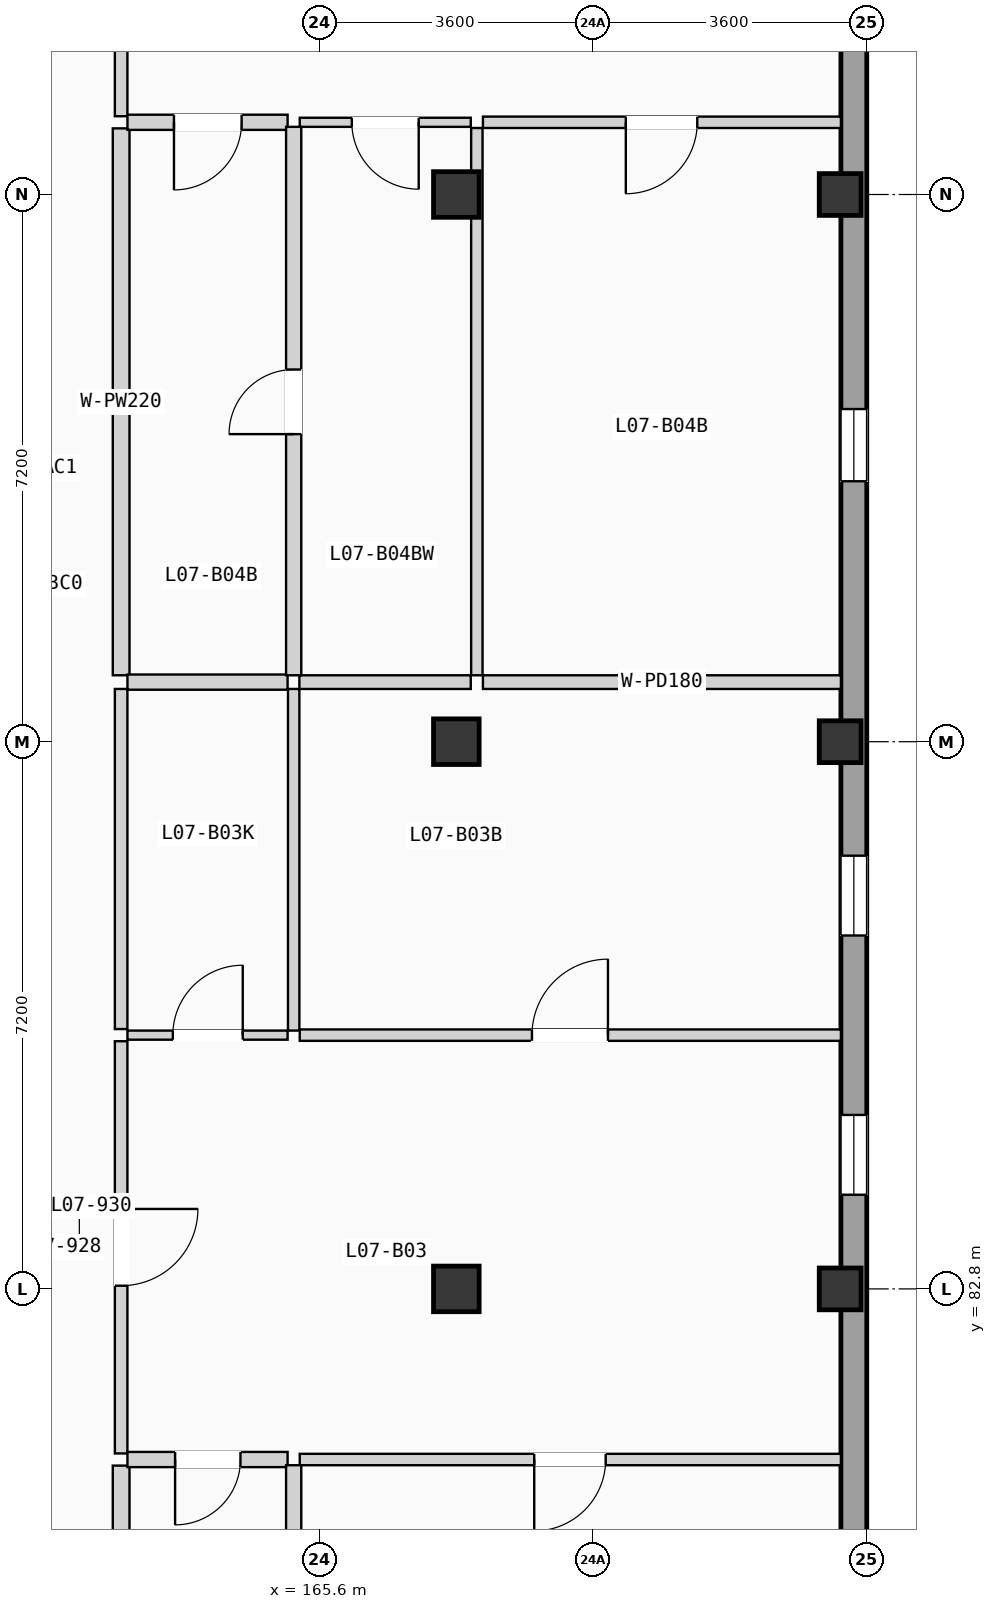
"""IFC4 building model, lengths in metres.
Left out: names, types, materials, properties, quantities, classifications, styles, units other than length and angle.
Written with IfcOpenShell. Run it as: python <this file> out.ifc"""

import sys

from ifc_helpers import new_model, si_unit, direction, frame, frame_2d, origin, origin_2d, place, context, subcontext, project, spatial, rectangle, extrude, element, fill, save


model = new_model("IFC4")
c1 = context("Model", 3, precision=1e-05, world=origin(), true_north=direction((0.0, 1.0)))
c2 = subcontext(c1, "Body", "Model", "MODEL_VIEW")
j1 = project(units=[si_unit("LENGTHUNIT", "METRE"), si_unit("PLANEANGLEUNIT", "RADIAN")], contexts=[c1])
p1 = place(None, origin())
s1 = spatial("IfcSite", under=j1, at=p1, CompositionType="ELEMENT")
p2 = place(p1, origin())
s2 = spatial("IfcBuilding", under=s1, at=p2, CompositionType="ELEMENT")
p3 = place(p2, frame((0.0, 0.0, 24.675)))
s3 = spatial("IfcBuildingStorey", under=s2, at=p3, CompositionType="ELEMENT", Elevation=24.675)
for number, where, z_axis, x_axis in (
    (1, (167.4, 82.8, 0.0), (0.0, 0.0, 1.0), (1.0, 0.0, 0.0)),
    (2, (167.4, 90.0, 0.0), (0.0, 0.0, 1.0), (1.0, 0.0, 0.0)),
    (3, (167.4, 97.2, 0.0), (0.0, 0.0, 1.0), (1.0, 0.0, 0.0)),
):
    element("IfcColumn", number, at=place(p3, frame(where, z_axis=z_axis, x_axis=x_axis)), inside=s3, PredefinedType="COLUMN", context=c2, shape_type="SweptSolid", body=[
        extrude(rectangle(XDim=0.6, YDim=0.6, at=origin_2d()), origin(), (0.0, 0.0, 1.0), 3.15),
    ])
for number, where, z_axis, x_axis in (
    (4, (172.45, 82.8, 0.0), (0.0, 0.0, 1.0), (1.0, 0.0, 0.0)),
    (5, (172.45, 90.0, 0.0), (0.0, 0.0, 1.0), (1.0, 0.0, 0.0)),
    (6, (172.45, 97.2, 0.0), (0.0, 0.0, 1.0), (1.0, 0.0, 0.0)),
):
    element("IfcColumn", number, at=place(p3, frame(where, z_axis=z_axis, x_axis=x_axis)), inside=s3, PredefinedType="COLUMN", context=c2, shape_type="SweptSolid", body=[
        extrude(rectangle(XDim=0.55, YDim=0.55, at=origin_2d()), origin(), (0.0, 0.0, 1.0), 3.15),
    ])
p4 = place(p3, frame((172.63, 68.74, 0.0), z_axis=(0.0, 0.0, 1.0), x_axis=(0.0, 1.0, 0.0)))
e7 = element("IfcWall", 7, at=p4, inside=s3, PredefinedType="SOLIDWALL", context=c2, shape_type="SweptSolid", body=[
    extrude(rectangle(XDim=49.72, YDim=0.34, at=frame_2d((24.86, 0.0))), origin(), (0.0, 0.0, 1.0), 2.9),
])
p5 = place(p4, frame((15.299, 0.0, 0.9)))
e8 = element("IfcOpeningElement", 8, at=p5, cuts=e7, PredefinedType="OPENING", context=c2, shape_type="SweptSolid", body=[
    extrude(rectangle(XDim=1.05, YDim=1.2, at=frame_2d((0.525, 0.6))), frame((0.0, 0.18, 0.0), z_axis=(0.0, -1.0, 0.0), x_axis=(1.0, 0.0, 0.0)), (0.0, 0.0, 1.0), 0.36),
])
p6 = place(p4, frame((8.972, 0.0, 0.865)))
e9 = element("IfcOpeningElement", 9, at=p6, cuts=e7, PredefinedType="OPENING", context=c2, shape_type="SweptSolid", body=[
    extrude(rectangle(XDim=1.05, YDim=1.35, at=frame_2d((0.525, 0.675))), frame((0.0, 0.18, 0.0), z_axis=(0.0, -1.0, 0.0), x_axis=(1.0, 0.0, 0.0)), (0.0, 0.0, 1.0), 0.36),
])
p7 = place(p4, frame((18.71, 0.0, 0.715)))
e10 = element("IfcOpeningElement", 10, at=p7, cuts=e7, PredefinedType="OPENING", context=c2, shape_type="SweptSolid", body=[
    extrude(rectangle(XDim=1.05, YDim=1.5, at=frame_2d((0.525, 0.75))), frame((0.0, 0.18, 0.0), z_axis=(0.0, -1.0, 0.0), x_axis=(1.0, 0.0, 0.0)), (0.0, 0.0, 1.0), 0.36),
])
p8 = place(p4, frame((31.535, 0.0, 0.565)))
e11 = element("IfcOpeningElement", 11, at=p8, cuts=e7, PredefinedType="OPENING", context=c2, shape_type="SweptSolid", body=[
    extrude(rectangle(XDim=1.05, YDim=1.65, at=frame_2d((0.525, 0.825))), frame((0.0, 0.18, 0.0), z_axis=(0.0, -1.0, 0.0), x_axis=(1.0, 0.0, 0.0)), (0.0, 0.0, 1.0), 0.36),
])
p9 = place(p4, frame((24.687, 0.0, 0.85)))
e12 = element("IfcOpeningElement", 12, at=p9, cuts=e7, PredefinedType="OPENING", context=c2, shape_type="SweptSolid", body=[
    extrude(rectangle(XDim=0.95, YDim=1.2, at=frame_2d((0.475, 0.6))), frame((0.0, 0.18, 0.0), z_axis=(0.0, -1.0, 0.0), x_axis=(1.0, 0.0, 0.0)), (0.0, 0.0, 1.0), 0.36),
])
p10 = place(p4, frame((38.62, 0.0, 0.9)))
e13 = element("IfcOpeningElement", 13, at=p10, cuts=e7, PredefinedType="OPENING", context=c2, shape_type="SweptSolid", body=[
    extrude(rectangle(XDim=1.15, YDim=1.2, at=frame_2d((0.575, 0.6))), frame((0.0, 0.18, 0.0), z_axis=(0.0, -1.0, 0.0), x_axis=(1.0, 0.0, 0.0)), (0.0, 0.0, 1.0), 0.36),
])
p11 = place(p3, frame((162.99, 80.635, 0.0), z_axis=(0.0, 0.0, 1.0), x_axis=(0.0, 1.0, 0.0)))
e14 = element("IfcWall", 14, at=p11, inside=s3, PredefinedType="PARTITIONING", context=c2, shape_type="SweptSolid", body=[
    extrude(rectangle(XDim=5.424, YDim=0.165, at=frame_2d((2.712, 0.0))), origin(), (0.0, 0.0, 1.0), 2.87),
])
p12 = place(p11, frame((2.207, 0.0, 0.0)))
e15 = element("IfcOpeningElement", 15, at=p12, cuts=e14, PredefinedType="OPENING", context=c2, shape_type="SweptSolid", body=[
    extrude(rectangle(XDim=1.01, YDim=2.11, at=frame_2d((0.505, 1.055))), frame((0.0, 0.093, 0.0), z_axis=(0.0, -1.0, 0.0), x_axis=(1.0, 0.0, 0.0)), (0.0, 0.0, 1.0), 0.185),
])
p13 = place(p3, frame((162.99, 75.975, 0.0), z_axis=(0.0, 0.0, 1.0), x_axis=(0.0, 1.0, 0.0)))
e16 = element("IfcWall", 16, at=p13, inside=s3, PredefinedType="PLUMBINGWALL", context=c2, shape_type="SweptSolid", body=[
    extrude(rectangle(XDim=4.5, YDim=0.22, at=frame_2d((2.25, 0.0))), origin(), (0.0, 0.0, 1.0), 2.87),
])
p14 = place(p3, frame((162.99, 86.219, 0.0), z_axis=(0.0, 0.0, 1.0), x_axis=(0.0, 1.0, 0.0)))
e17 = element("IfcWall", 17, at=p14, inside=s3, PredefinedType="PARTITIONING", context=c2, shape_type="SweptSolid", body=[
    extrude(rectangle(XDim=4.475, YDim=0.165, at=frame_2d((2.238, 0.0))), origin(), (0.0, 0.0, 1.0), 2.87),
])
p15 = place(p3, frame((162.99, 98.23, 0.0), z_axis=(0.0, 0.0, 1.0), x_axis=(0.0, 1.0, 0.0)))
e18 = element("IfcWall", 18, at=p15, inside=s3, PredefinedType="PARTITIONING", context=c2, shape_type="SweptSolid", body=[
    extrude(rectangle(XDim=5.14, YDim=0.165, at=frame_2d((2.57, 0.0))), origin(), (0.0, 0.0, 1.0), 2.87),
])
p16 = place(p15, frame((2.065, 0.0, 0.0)))
e19 = element("IfcOpeningElement", 19, at=p16, cuts=e18, PredefinedType="OPENING", context=c2, shape_type="SweptSolid", body=[
    extrude(rectangle(XDim=1.01, YDim=2.11, at=frame_2d((0.505, 1.055))), frame((0.0, 0.093, 0.0), z_axis=(0.0, -1.0, 0.0), x_axis=(1.0, 0.0, 0.0)), (0.0, 0.0, 1.0), 0.185),
])
p17 = place(p3, frame((162.99, 90.874, 0.0), z_axis=(0.0, 0.0, 1.0), x_axis=(0.0, 1.0, 0.0)))
e20 = element("IfcWall", 20, at=p17, inside=s3, PredefinedType="PLUMBINGWALL", context=c2, shape_type="SweptSolid", body=[
    extrude(rectangle(XDim=7.196, YDim=0.22, at=frame_2d((3.598, 0.0))), origin(), (0.0, 0.0, 1.0), 2.87),
])
p18 = place(p3, frame((163.073, 80.555, 0.0), z_axis=(0.0, 0.0, 1.0), x_axis=(1.0, 0.0, 0.0)))
e21 = element("IfcWall", 21, at=p18, inside=s3, PredefinedType="PLUMBINGWALL", context=c2, shape_type="SweptSolid", body=[
    extrude(rectangle(XDim=2.107, YDim=0.2, at=frame_2d((1.053, 0.0))), origin(), (0.0, 0.0, 1.0), 2.87),
])
p19 = place(p18, frame((0.627, 0.0, 0.0)))
e22 = element("IfcOpeningElement", 22, at=p19, cuts=e21, PredefinedType="OPENING", context=c2, shape_type="SweptSolid", body=[
    extrude(rectangle(XDim=0.86, YDim=2.0, at=frame_2d((0.43, 1.0))), frame((0.0, 0.11, 0.0), z_axis=(0.0, -1.0, 0.0), x_axis=(1.0, 0.0, 0.0)), (0.0, 0.0, 1.0), 0.22),
])
p20 = place(p3, frame((163.073, 86.139, 0.0), z_axis=(0.0, 0.0, 1.0), x_axis=(1.0, 0.0, 0.0)))
e23 = element("IfcWall", 23, at=p20, inside=s3, PredefinedType="PARTITIONING", context=c2, shape_type="SweptSolid", body=[
    extrude(rectangle(XDim=2.107, YDim=0.12, at=frame_2d((1.053, 0.0))), origin(), (0.0, 0.0, 1.0), 2.87),
])
p21 = place(p20, frame((0.597, 0.0, 0.0)))
e24 = element("IfcOpeningElement", 24, at=p21, cuts=e23, PredefinedType="OPENING", context=c2, shape_type="SweptSolid", body=[
    extrude(rectangle(XDim=0.92, YDim=2.02, at=frame_2d((0.46, 1.01))), frame((0.0, 0.07, 0.0), z_axis=(0.0, -1.0, 0.0), x_axis=(1.0, 0.0, 0.0)), (0.0, 0.0, 1.0), 0.14),
])
p22 = place(p3, frame((165.34, 80.555, 0.0), z_axis=(0.0, 0.0, 1.0), x_axis=(1.0, 0.0, 0.0)))
e25 = element("IfcWall", 25, at=p22, inside=s3, PredefinedType="PARTITIONING", context=c2, shape_type="SweptSolid", body=[
    extrude(rectangle(XDim=7.12, YDim=0.15, at=frame_2d((3.56, 0.0))), origin(), (0.0, 0.0, 1.0), 2.87),
])
p23 = place(p22, frame((3.085, 0.0, 0.0)))
e26 = element("IfcOpeningElement", 26, at=p23, cuts=e25, PredefinedType="OPENING", context=c2, shape_type="SweptSolid", body=[
    extrude(rectangle(XDim=0.94, YDim=2.06, at=frame_2d((0.47, 1.03))), frame((0.0, 0.085, 0.0), z_axis=(0.0, -1.0, 0.0), x_axis=(1.0, 0.0, 0.0)), (0.0, 0.0, 1.0), 0.17),
])
p24 = place(p3, frame((165.34, 86.139, 0.0), z_axis=(0.0, 0.0, 1.0), x_axis=(1.0, 0.0, 0.0)))
e27 = element("IfcWall", 27, at=p24, inside=s3, PredefinedType="PARTITIONING", context=c2, shape_type="SweptSolid", body=[
    extrude(rectangle(XDim=7.12, YDim=0.15, at=frame_2d((3.56, 0.0))), origin(), (0.0, 0.0, 1.0), 2.87),
])
p25 = place(p24, frame((3.055, 0.0, 0.0)))
e28 = element("IfcOpeningElement", 28, at=p25, cuts=e27, PredefinedType="OPENING", context=c2, shape_type="SweptSolid", body=[
    extrude(rectangle(XDim=1.0, YDim=2.06, at=frame_2d((0.5, 1.03))), frame((0.0, 0.085, 0.0), z_axis=(0.0, -1.0, 0.0), x_axis=(1.0, 0.0, 0.0)), (0.0, 0.0, 1.0), 0.17),
])
p26 = place(p3, frame((165.26, 75.975, 0.0), z_axis=(0.0, 0.0, 1.0), x_axis=(0.0, 1.0, 0.0)))
e29 = element("IfcWall", 29, at=p26, inside=s3, PredefinedType="PLUMBINGWALL", context=c2, shape_type="SweptSolid", body=[
    extrude(rectangle(XDim=4.505, YDim=0.2, at=frame_2d((2.252, 0.0))), origin(), (0.0, 0.0, 1.0), 2.87),
])
p27 = place(p3, frame((165.26, 86.199, 0.0), z_axis=(0.0, 0.0, 1.0), x_axis=(0.0, 1.0, 0.0)))
e30 = element("IfcWall", 30, at=p27, inside=s3, PredefinedType="PARTITIONING", context=c2, shape_type="SweptSolid", body=[
    extrude(rectangle(XDim=4.495, YDim=0.15, at=frame_2d((2.248, 0.0))), origin(), (0.0, 0.0, 1.0), 2.87),
])
p28 = place(p3, frame((163.073, 90.784, 0.0), z_axis=(0.0, 0.0, 1.0), x_axis=(1.0, 0.0, 0.0)))
e31 = element("IfcWall", 31, at=p28, inside=s3, PredefinedType="PLUMBINGWALL", context=c2, shape_type="SweptSolid", body=[
    extrude(rectangle(XDim=2.107, YDim=0.2, at=frame_2d((1.053, 0.0))), origin(), (0.0, 0.0, 1.0), 2.87),
])
p29 = place(p3, frame((167.75, 90.784, 0.0), z_axis=(0.0, 0.0, 1.0), x_axis=(1.0, 0.0, 0.0)))
e32 = element("IfcWall", 32, at=p29, inside=s3, PredefinedType="PARTITIONING", context=c2, shape_type="SweptSolid", body=[
    extrude(rectangle(XDim=4.71, YDim=0.18, at=frame_2d((2.355, 0.0))), origin(), (0.0, 0.0, 1.0), 2.87),
])
p30 = place(p3, frame((165.335, 90.784, 0.0), z_axis=(0.0, 0.0, 1.0), x_axis=(1.0, 0.0, 0.0)))
e33 = element("IfcWall", 33, at=p30, inside=s3, PredefinedType="PARTITIONING", context=c2, shape_type="SweptSolid", body=[
    extrude(rectangle(XDim=2.255, YDim=0.18, at=frame_2d((1.127, 0.0))), origin(), (0.0, 0.0, 1.0), 2.87),
])
p31 = place(p3, frame((163.073, 98.15, 0.0), z_axis=(0.0, 0.0, 1.0), x_axis=(1.0, 0.0, 0.0)))
e34 = element("IfcWall", 34, at=p31, inside=s3, PredefinedType="PLUMBINGWALL", context=c2, shape_type="SweptSolid", body=[
    extrude(rectangle(XDim=2.107, YDim=0.2, at=frame_2d((1.053, 0.0))), origin(), (0.0, 0.0, 1.0), 2.87),
])
p32 = place(p31, frame((0.612, 0.0, 0.0)))
e35 = element("IfcOpeningElement", 35, at=p32, cuts=e34, PredefinedType="OPENING", context=c2, shape_type="SweptSolid", body=[
    extrude(rectangle(XDim=0.89, YDim=2.03, at=frame_2d((0.445, 1.015))), frame((0.0, 0.11, 0.0), z_axis=(0.0, -1.0, 0.0), x_axis=(1.0, 0.0, 0.0)), (0.0, 0.0, 1.0), 0.22),
])
p33 = place(p3, frame((167.75, 98.15, 0.0), z_axis=(0.0, 0.0, 1.0), x_axis=(1.0, 0.0, 0.0)))
e36 = element("IfcWall", 36, at=p33, inside=s3, PredefinedType="PARTITIONING", context=c2, shape_type="SweptSolid", body=[
    extrude(rectangle(XDim=4.71, YDim=0.15, at=frame_2d((2.355, 0.0))), origin(), (0.0, 0.0, 1.0), 2.87),
])
p34 = place(p33, frame((1.88, 0.0, 0.0)))
e37 = element("IfcOpeningElement", 37, at=p34, cuts=e36, PredefinedType="OPENING", context=c2, shape_type="SweptSolid", body=[
    extrude(rectangle(XDim=0.94, YDim=2.06, at=frame_2d((0.47, 1.03))), frame((0.0, 0.085, 0.0), z_axis=(0.0, -1.0, 0.0), x_axis=(1.0, 0.0, 0.0)), (0.0, 0.0, 1.0), 0.17),
])
p35 = place(p3, frame((165.34, 98.15, 0.0), z_axis=(0.0, 0.0, 1.0), x_axis=(1.0, 0.0, 0.0)))
e38 = element("IfcWall", 38, at=p35, inside=s3, PredefinedType="PARTITIONING", context=c2, shape_type="SweptSolid", body=[
    extrude(rectangle(XDim=2.25, YDim=0.12, at=frame_2d((1.125, 0.0))), origin(), (0.0, 0.0, 1.0), 2.87),
])
p36 = place(p35, frame((0.685, 0.0, 0.0)))
e39 = element("IfcOpeningElement", 39, at=p36, cuts=e38, PredefinedType="OPENING", context=c2, shape_type="SweptSolid", body=[
    extrude(rectangle(XDim=0.88, YDim=2.02, at=frame_2d((0.44, 1.01))), frame((0.0, 0.07, 0.0), z_axis=(0.0, -1.0, 0.0), x_axis=(1.0, 0.0, 0.0)), (0.0, 0.0, 1.0), 0.14),
])
p37 = place(p3, frame((165.26, 90.874, 0.0), z_axis=(0.0, 0.0, 1.0), x_axis=(0.0, 1.0, 0.0)))
e40 = element("IfcWall", 40, at=p37, inside=s3, PredefinedType="PLUMBINGWALL", context=c2, shape_type="SweptSolid", body=[
    extrude(rectangle(XDim=7.216, YDim=0.2, at=frame_2d((3.608, 0.0))), origin(), (0.0, 0.0, 1.0), 2.87),
])
p38 = place(p37, frame((3.173, 0.0, 0.0)))
e41 = element("IfcOpeningElement", 41, at=p38, cuts=e40, PredefinedType="OPENING", context=c2, shape_type="SweptSolid", body=[
    extrude(rectangle(XDim=0.85, YDim=2.01, at=frame_2d((0.425, 1.005))), frame((0.0, 0.11, 0.0), z_axis=(0.0, -1.0, 0.0), x_axis=(1.0, 0.0, 0.0)), (0.0, 0.0, 1.0), 0.22),
])
p39 = place(p3, frame((167.67, 90.874, 0.0), z_axis=(0.0, 0.0, 1.0), x_axis=(0.0, 1.0, 0.0)))
e42 = element("IfcWall", 42, at=p39, inside=s3, PredefinedType="PARTITIONING", context=c2, shape_type="SweptSolid", body=[
    extrude(rectangle(XDim=7.201, YDim=0.15, at=frame_2d((3.601, 0.0))), origin(), (0.0, 0.0, 1.0), 2.87),
])
p40 = place(p5, origin())
e43 = element("IfcWindow", 43, at=p40, inside=s3, PartitioningType="SINGLE_PANEL", PredefinedType="WINDOW", context=c2, shape_type="SweptSolid", body=[
    extrude(rectangle(XDim=1.05, YDim=1.2, at=frame_2d((0.525, 0.6))), frame((0.0, 0.03, 0.0), z_axis=(0.0, -1.0, 0.0), x_axis=(1.0, 0.0, 0.0)), (0.0, 0.0, 1.0), 0.06),
])
fill(e8, e43)
p41 = place(p7, origin())
e44 = element("IfcWindow", 44, at=p41, inside=s3, PartitioningType="SINGLE_PANEL", PredefinedType="WINDOW", context=c2, shape_type="SweptSolid", body=[
    extrude(rectangle(XDim=1.05, YDim=1.5, at=frame_2d((0.525, 0.75))), frame((0.0, 0.03, 0.0), z_axis=(0.0, -1.0, 0.0), x_axis=(1.0, 0.0, 0.0)), (0.0, 0.0, 1.0), 0.06),
])
fill(e10, e44)
p42 = place(p9, origin())
e45 = element("IfcWindow", 45, at=p42, inside=s3, PartitioningType="SINGLE_PANEL", PredefinedType="WINDOW", context=c2, shape_type="SweptSolid", body=[
    extrude(rectangle(XDim=0.95, YDim=1.2, at=frame_2d((0.475, 0.6))), frame((0.0, 0.03, 0.0), z_axis=(0.0, -1.0, 0.0), x_axis=(1.0, 0.0, 0.0)), (0.0, 0.0, 1.0), 0.06),
])
fill(e12, e45)
p43 = place(p12, frame((1.01, 0.0, 0.0), z_axis=(0.0, 0.0, 1.0), x_axis=(-1.0, 0.0, 0.0)))
e46 = element("IfcDoor", 46, at=p43, inside=s3, OperationType="SINGLE_SWING_RIGHT", PredefinedType="DOOR", context=c2, shape_type="SweptSolid", body=[
    extrude(rectangle(XDim=1.01, YDim=2.11, at=frame_2d((0.505, 1.055))), frame((0.0, 0.025, 0.0), z_axis=(0.0, -1.0, 0.0), x_axis=(1.0, 0.0, 0.0)), (0.0, 0.0, 1.0), 0.05),
])
fill(e15, e46)
p44 = place(p19, frame((0.86, 0.0, 0.0), z_axis=(0.0, 0.0, 1.0), x_axis=(-1.0, 0.0, 0.0)))
e47 = element("IfcDoor", 47, at=p44, inside=s3, OperationType="SINGLE_SWING_LEFT", PredefinedType="DOOR", context=c2, shape_type="SweptSolid", body=[
    extrude(rectangle(XDim=0.86, YDim=2.0, at=frame_2d((0.43, 1.0))), frame((0.0, 0.025, 0.0), z_axis=(0.0, -1.0, 0.0), x_axis=(1.0, 0.0, 0.0)), (0.0, 0.0, 1.0), 0.05),
])
fill(e22, e47)
p45 = place(p21, origin())
e48 = element("IfcDoor", 48, at=p45, inside=s3, OperationType="SINGLE_SWING_RIGHT", PredefinedType="DOOR", context=c2, shape_type="SweptSolid", body=[
    extrude(rectangle(XDim=0.92, YDim=2.02, at=frame_2d((0.46, 1.01))), frame((0.0, 0.025, 0.0), z_axis=(0.0, -1.0, 0.0), x_axis=(1.0, 0.0, 0.0)), (0.0, 0.0, 1.0), 0.05),
])
fill(e24, e48)
p46 = place(p23, frame((0.94, 0.0, 0.0), z_axis=(0.0, 0.0, 1.0), x_axis=(-1.0, 0.0, 0.0)))
e49 = element("IfcDoor", 49, at=p46, inside=s3, OperationType="SINGLE_SWING_LEFT", PredefinedType="DOOR", context=c2, shape_type="SweptSolid", body=[
    extrude(rectangle(XDim=0.94, YDim=2.06, at=frame_2d((0.47, 1.03))), frame((0.0, 0.025, 0.0), z_axis=(0.0, -1.0, 0.0), x_axis=(1.0, 0.0, 0.0)), (0.0, 0.0, 1.0), 0.05),
])
fill(e26, e49)
p47 = place(p25, origin())
e50 = element("IfcDoor", 50, at=p47, inside=s3, OperationType="SINGLE_SWING_RIGHT", PredefinedType="DOOR", context=c2, shape_type="SweptSolid", body=[
    extrude(rectangle(XDim=1.0, YDim=2.06, at=frame_2d((0.5, 1.03))), frame((0.0, 0.025, 0.0), z_axis=(0.0, -1.0, 0.0), x_axis=(1.0, 0.0, 0.0)), (0.0, 0.0, 1.0), 0.05),
])
fill(e28, e50)
p48 = place(p32, frame((0.89, 0.0, 0.0), z_axis=(0.0, 0.0, 1.0), x_axis=(-1.0, 0.0, 0.0)))
e51 = element("IfcDoor", 51, at=p48, inside=s3, OperationType="SINGLE_SWING_LEFT", PredefinedType="DOOR", context=c2, shape_type="SweptSolid", body=[
    extrude(rectangle(XDim=0.89, YDim=2.03, at=frame_2d((0.445, 1.015))), frame((0.0, 0.025, 0.0), z_axis=(0.0, -1.0, 0.0), x_axis=(1.0, 0.0, 0.0)), (0.0, 0.0, 1.0), 0.05),
])
fill(e35, e51)
p49 = place(p34, frame((0.94, 0.0, 0.0), z_axis=(0.0, 0.0, 1.0), x_axis=(-1.0, 0.0, 0.0)))
e52 = element("IfcDoor", 52, at=p49, inside=s3, OperationType="SINGLE_SWING_LEFT", PredefinedType="DOOR", context=c2, shape_type="SweptSolid", body=[
    extrude(rectangle(XDim=0.94, YDim=2.06, at=frame_2d((0.47, 1.03))), frame((0.0, 0.025, 0.0), z_axis=(0.0, -1.0, 0.0), x_axis=(1.0, 0.0, 0.0)), (0.0, 0.0, 1.0), 0.05),
])
fill(e37, e52)
p50 = place(p36, frame((0.88, 0.0, 0.0), z_axis=(0.0, 0.0, 1.0), x_axis=(-1.0, 0.0, 0.0)))
e53 = element("IfcDoor", 53, at=p50, inside=s3, OperationType="SINGLE_SWING_RIGHT", PredefinedType="DOOR", context=c2, shape_type="SweptSolid", body=[
    extrude(rectangle(XDim=0.88, YDim=2.02, at=frame_2d((0.44, 1.01))), frame((0.0, 0.025, 0.0), z_axis=(0.0, -1.0, 0.0), x_axis=(1.0, 0.0, 0.0)), (0.0, 0.0, 1.0), 0.05),
])
fill(e39, e53)
p51 = place(p38, origin())
e54 = element("IfcDoor", 54, at=p51, inside=s3, OperationType="SINGLE_SWING_LEFT", PredefinedType="DOOR", context=c2, shape_type="SweptSolid", body=[
    extrude(rectangle(XDim=0.85, YDim=2.01, at=frame_2d((0.425, 1.005))), frame((0.0, 0.025, 0.0), z_axis=(0.0, -1.0, 0.0), x_axis=(1.0, 0.0, 0.0)), (0.0, 0.0, 1.0), 0.05),
])
fill(e41, e54)
save(model, sys.argv[1])
